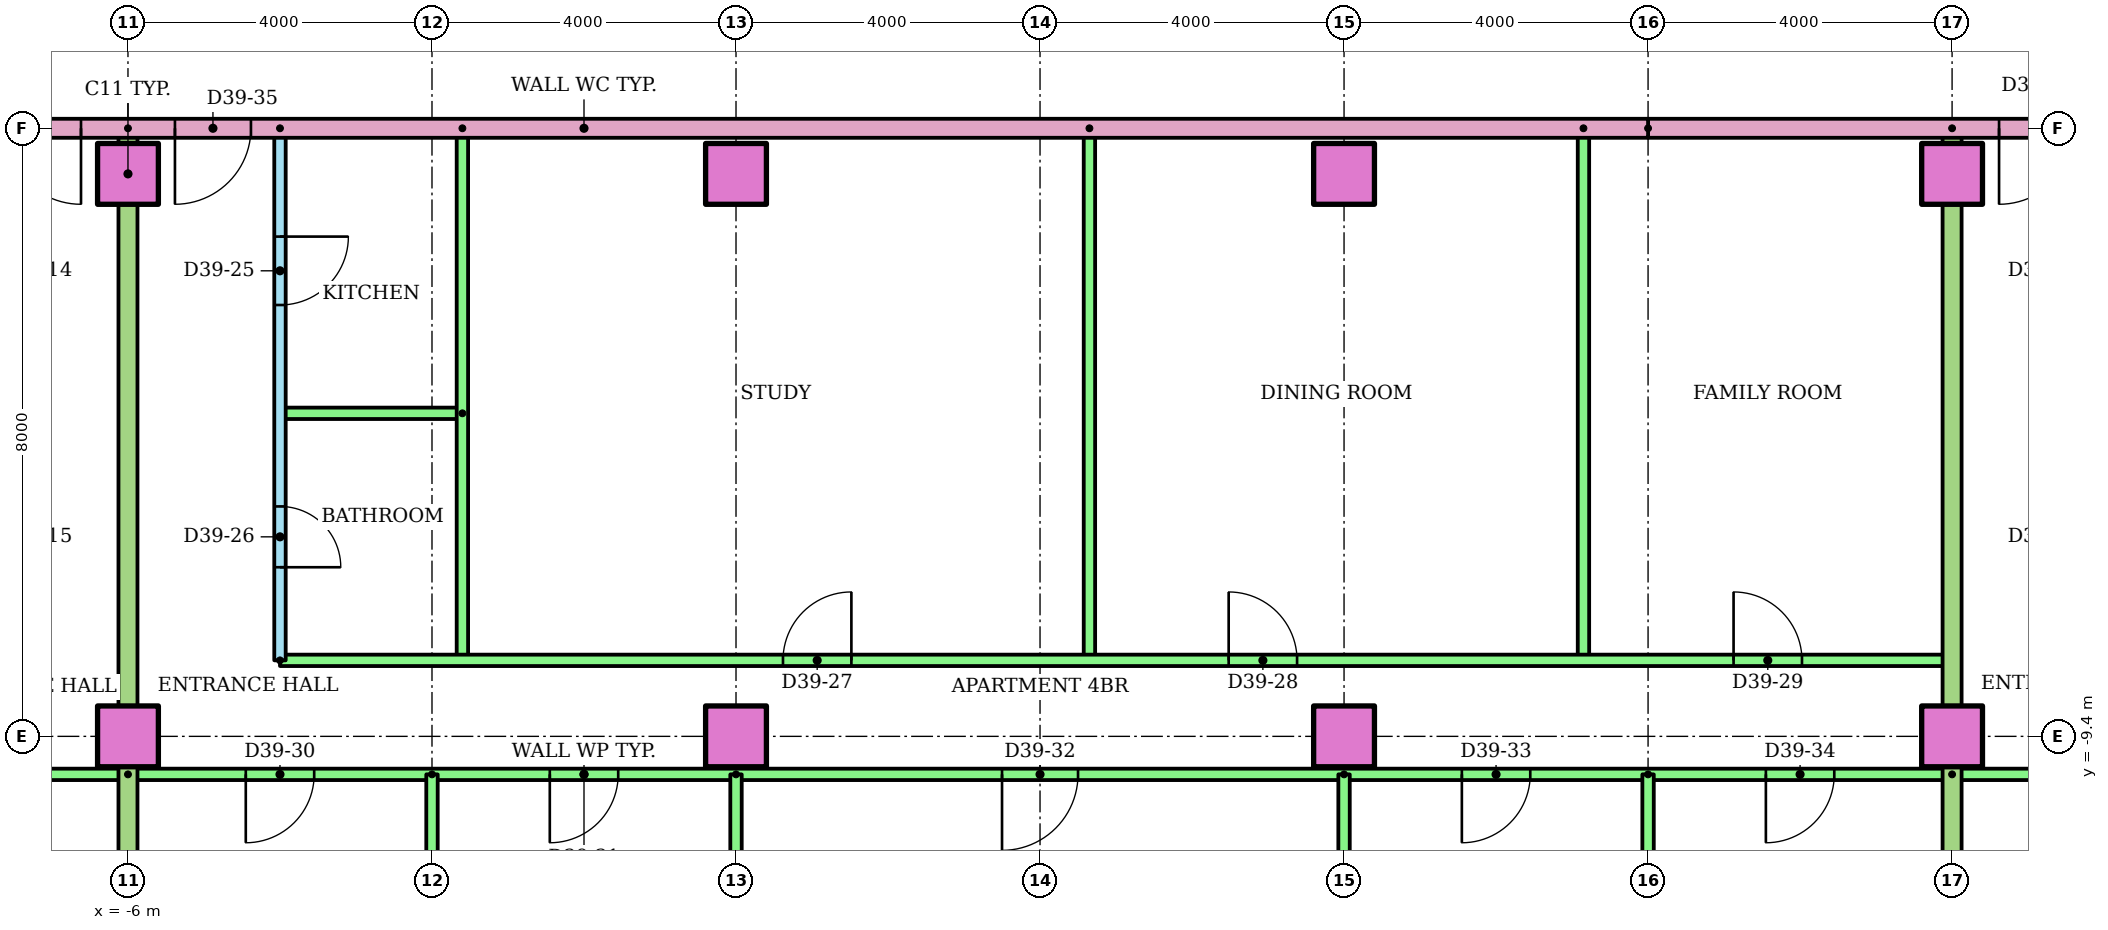
"""IFC4 building model, lengths in metres.
Left out: names, types, materials, properties, quantities, classifications, styles, units other than length and angle.
Written with IfcOpenShell. Run it as: python <this file> out.ifc"""

import sys

from ifc_helpers import new_model, si_unit, direction, frame, frame_2d, origin, origin_2d, place, context, subcontext, project, spatial, rectangle, extrude, element, fill, save


model = new_model("IFC4")
c1 = context("Model", 3, precision=1e-05, world=origin(), true_north=direction((0.0, 1.0)))
c2 = subcontext(c1, "Body", "Model", "MODEL_VIEW")
j1 = project(units=[si_unit("LENGTHUNIT", "METRE"), si_unit("PLANEANGLEUNIT", "RADIAN")], contexts=[c1])
p1 = place(None, origin())
s1 = spatial("IfcSite", under=j1, at=p1, CompositionType="ELEMENT")
p2 = place(p1, origin())
s2 = spatial("IfcBuilding", under=s1, at=p2, CompositionType="ELEMENT")
p3 = place(p2, frame((0.0, 0.0, 148.6)))
s3 = spatial("IfcBuildingStorey", under=s2, at=p3, CompositionType="ELEMENT", Elevation=148.6)
for number, where in (
    (1, (-6.0, -9.4, 0.0)),
    (2, (2.0, -9.4, 0.0)),
    (3, (10.0, -9.4, 0.0)),
    (4, (18.0, -9.4, 0.0)),
    (5, (-6.0, -2.0, 0.0)),
    (6, (2.0, -2.0, 0.0)),
    (7, (10.0, -2.0, 0.0)),
    (8, (18.0, -2.0, 0.0)),
):
    element("IfcColumn", number, at=place(p3, frame(where)), inside=s3, PredefinedType="COLUMN", context=c2, shape_type="SweptSolid", body=[
        extrude(rectangle(XDim=0.8, YDim=0.8, at=origin_2d()), origin(), (0.0, 0.0, 1.0), 3.2),
    ])
p4 = place(p3, frame((-6.0, -9.9, 0.0), z_axis=(0.0, 0.0, 1.0), x_axis=(-1.0, 0.0, 0.0)))
e9 = element("IfcWall", 9, at=p4, inside=s3, PredefinedType="PARTITIONING", context=c2, shape_type="SweptSolid", body=[
    extrude(rectangle(XDim=26.72, YDim=0.15, at=frame_2d((13.36, 0.0))), origin(), (0.0, 0.0, 1.0), 2.4),
])
p5 = place(p4, frame((20.75, 0.0, 0.0)))
e10 = element("IfcOpeningElement", 10, at=p5, cuts=e9, PredefinedType="OPENING", context=c2, shape_type="SweptSolid", body=[
    extrude(rectangle(XDim=1.0, YDim=2.1, at=frame_2d((0.5, 1.05))), frame((0.0, 0.085, 0.0), z_axis=(0.0, -1.0, 0.0), x_axis=(1.0, 0.0, 0.0)), (0.0, 0.0, 1.0), 0.17),
])
p6 = place(p4, frame((13.55, 0.0, 0.0)))
e11 = element("IfcOpeningElement", 11, at=p6, cuts=e9, PredefinedType="OPENING", context=c2, shape_type="SweptSolid", body=[
    extrude(rectangle(XDim=0.9, YDim=2.1, at=frame_2d((0.45, 1.05))), frame((0.0, 0.085, 0.0), z_axis=(0.0, -1.0, 0.0), x_axis=(1.0, 0.0, 0.0)), (0.0, 0.0, 1.0), 0.17),
])
p7 = place(p4, frame((9.55, 0.0, 0.0)))
e12 = element("IfcOpeningElement", 12, at=p7, cuts=e9, PredefinedType="OPENING", context=c2, shape_type="SweptSolid", body=[
    extrude(rectangle(XDim=0.9, YDim=2.1, at=frame_2d((0.45, 1.05))), frame((0.0, 0.085, 0.0), z_axis=(0.0, -1.0, 0.0), x_axis=(1.0, 0.0, 0.0)), (0.0, 0.0, 1.0), 0.17),
])
p8 = place(p4, frame((5.55, 0.0, 0.0)))
e13 = element("IfcOpeningElement", 13, at=p8, cuts=e9, PredefinedType="OPENING", context=c2, shape_type="SweptSolid", body=[
    extrude(rectangle(XDim=0.9, YDim=2.1, at=frame_2d((0.45, 1.05))), frame((0.0, 0.085, 0.0), z_axis=(0.0, -1.0, 0.0), x_axis=(1.0, 0.0, 0.0)), (0.0, 0.0, 1.0), 0.17),
])
p9 = place(p4, frame((1.55, 0.0, 0.0)))
e14 = element("IfcOpeningElement", 14, at=p9, cuts=e9, PredefinedType="OPENING", context=c2, shape_type="SweptSolid", body=[
    extrude(rectangle(XDim=0.9, YDim=2.1, at=frame_2d((0.45, 1.05))), frame((0.0, 0.085, 0.0), z_axis=(0.0, -1.0, 0.0), x_axis=(1.0, 0.0, 0.0)), (0.0, 0.0, 1.0), 0.17),
])
p10 = place(p3, frame((-4.0, -1.4, 0.0), z_axis=(0.0, 0.0, 1.0), x_axis=(0.0, -1.0, 0.0)))
e15 = element("IfcWall", 15, at=p10, inside=s3, PredefinedType="PARTITIONING", context=c2, shape_type="SweptSolid", body=[
    extrude(rectangle(XDim=7.0, YDim=0.15, at=frame_2d((3.5, 0.0))), origin(), (0.0, 0.0, 1.0), 2.4),
])
p11 = place(p10, frame((1.425, 0.0, 0.0)))
e16 = element("IfcOpeningElement", 16, at=p11, cuts=e15, PredefinedType="OPENING", context=c2, shape_type="SweptSolid", body=[
    extrude(rectangle(XDim=0.9, YDim=2.1, at=frame_2d((0.45, 1.05))), frame((0.0, 0.085, 0.0), z_axis=(0.0, -1.0, 0.0), x_axis=(1.0, 0.0, 0.0)), (0.0, 0.0, 1.0), 0.17),
])
p12 = place(p10, frame((4.975, 0.0, 0.0)))
e17 = element("IfcOpeningElement", 17, at=p12, cuts=e15, PredefinedType="OPENING", context=c2, shape_type="SweptSolid", body=[
    extrude(rectangle(XDim=0.8, YDim=2.1, at=frame_2d((0.4, 1.05))), frame((0.0, 0.085, 0.0), z_axis=(0.0, -1.0, 0.0), x_axis=(1.0, 0.0, 0.0)), (0.0, 0.0, 1.0), 0.17),
])
p13 = place(p3, frame((-1.6, -5.15, 0.0), z_axis=(0.0, 0.0, 1.0), x_axis=(-1.0, 0.0, 0.0)))
e18 = element("IfcWall", 18, at=p13, inside=s3, PredefinedType="PARTITIONING", context=c2, shape_type="SweptSolid", body=[
    extrude(rectangle(XDim=2.4, YDim=0.15, at=frame_2d((1.2, 0.0))), origin(), (0.0, 0.0, 1.0), 2.4),
])
for number, where, z_axis, x_axis in (
    (19, (-1.6, -1.4, 0.0), (0.0, 0.0, 1.0), (0.0, -1.0, 0.0)),
    (20, (6.65, -1.4, 0.0), (0.0, 0.0, 1.0), (0.0, -1.0, 0.0)),
    (21, (13.15, -1.4, 0.0), (0.0, 0.0, 1.0), (0.0, -1.0, 0.0)),
):
    element("IfcWall", number, at=place(p3, frame(where, z_axis=z_axis, x_axis=x_axis)), inside=s3, PredefinedType="PARTITIONING", context=c2, shape_type="SweptSolid", body=[
        extrude(rectangle(XDim=7.0, YDim=0.15, at=frame_2d((3.5, 0.0))), origin(), (0.0, 0.0, 1.0), 2.4),
    ])
p14 = place(p3, frame((-4.0, -8.4, 0.0)))
e22 = element("IfcWall", 22, at=p14, inside=s3, PredefinedType="PARTITIONING", context=c2, shape_type="SweptSolid", body=[
    extrude(rectangle(XDim=22.0, YDim=0.15, at=frame_2d((11.0, 0.0))), origin(), (0.0, 0.0, 1.0), 2.4),
])
p15 = place(p14, frame((6.618, 0.0, 0.0)))
e23 = element("IfcOpeningElement", 23, at=p15, cuts=e22, PredefinedType="OPENING", context=c2, shape_type="SweptSolid", body=[
    extrude(rectangle(XDim=0.9, YDim=2.1, at=frame_2d((0.45, 1.05))), frame((0.0, 0.085, 0.0), z_axis=(0.0, -1.0, 0.0), x_axis=(1.0, 0.0, 0.0)), (0.0, 0.0, 1.0), 0.17),
])
p16 = place(p14, frame((12.482, 0.0, 0.0)))
e24 = element("IfcOpeningElement", 24, at=p16, cuts=e22, PredefinedType="OPENING", context=c2, shape_type="SweptSolid", body=[
    extrude(rectangle(XDim=0.9, YDim=2.1, at=frame_2d((0.45, 1.05))), frame((0.0, 0.085, 0.0), z_axis=(0.0, -1.0, 0.0), x_axis=(1.0, 0.0, 0.0)), (0.0, 0.0, 1.0), 0.17),
])
p17 = place(p14, frame((19.125, 0.0, 0.0)))
e25 = element("IfcOpeningElement", 25, at=p17, cuts=e22, PredefinedType="OPENING", context=c2, shape_type="SweptSolid", body=[
    extrude(rectangle(XDim=0.9, YDim=2.1, at=frame_2d((0.45, 1.05))), frame((0.0, 0.085, 0.0), z_axis=(0.0, -1.0, 0.0), x_axis=(1.0, 0.0, 0.0)), (0.0, 0.0, 1.0), 0.17),
])
p18 = place(p3, frame((18.0, -9.9, 0.0), z_axis=(0.0, 0.0, 1.0), x_axis=(-1.0, 0.0, 0.0)))
e26 = element("IfcWall", 26, at=p18, inside=s3, PredefinedType="PARTITIONING", context=c2, shape_type="SweptSolid", body=[
    extrude(rectangle(XDim=24.0, YDim=0.15, at=frame_2d((12.0, 0.0))), origin(), (0.0, 0.0, 1.0), 2.4),
])
p19 = place(p18, frame((21.55, 0.0, 0.0)))
e27 = element("IfcOpeningElement", 27, at=p19, cuts=e26, PredefinedType="OPENING", context=c2, shape_type="SweptSolid", body=[
    extrude(rectangle(XDim=0.9, YDim=2.1, at=frame_2d((0.45, 1.05))), frame((0.0, 0.085, 0.0), z_axis=(0.0, -1.0, 0.0), x_axis=(1.0, 0.0, 0.0)), (0.0, 0.0, 1.0), 0.17),
])
p20 = place(p18, frame((17.55, 0.0, 0.0)))
e28 = element("IfcOpeningElement", 28, at=p20, cuts=e26, PredefinedType="OPENING", context=c2, shape_type="SweptSolid", body=[
    extrude(rectangle(XDim=0.9, YDim=2.1, at=frame_2d((0.45, 1.05))), frame((0.0, 0.085, 0.0), z_axis=(0.0, -1.0, 0.0), x_axis=(1.0, 0.0, 0.0)), (0.0, 0.0, 1.0), 0.17),
])
p21 = place(p18, frame((11.5, 0.0, 0.0)))
e29 = element("IfcOpeningElement", 29, at=p21, cuts=e26, PredefinedType="OPENING", context=c2, shape_type="SweptSolid", body=[
    extrude(rectangle(XDim=1.0, YDim=2.1, at=frame_2d((0.5, 1.05))), frame((0.0, 0.085, 0.0), z_axis=(0.0, -1.0, 0.0), x_axis=(1.0, 0.0, 0.0)), (0.0, 0.0, 1.0), 0.17),
])
p22 = place(p18, frame((5.55, 0.0, 0.0)))
e30 = element("IfcOpeningElement", 30, at=p22, cuts=e26, PredefinedType="OPENING", context=c2, shape_type="SweptSolid", body=[
    extrude(rectangle(XDim=0.9, YDim=2.1, at=frame_2d((0.45, 1.05))), frame((0.0, 0.085, 0.0), z_axis=(0.0, -1.0, 0.0), x_axis=(1.0, 0.0, 0.0)), (0.0, 0.0, 1.0), 0.17),
])
p23 = place(p18, frame((1.55, 0.0, 0.0)))
e31 = element("IfcOpeningElement", 31, at=p23, cuts=e26, PredefinedType="OPENING", context=c2, shape_type="SweptSolid", body=[
    extrude(rectangle(XDim=0.9, YDim=2.1, at=frame_2d((0.45, 1.05))), frame((0.0, 0.085, 0.0), z_axis=(0.0, -1.0, 0.0), x_axis=(1.0, 0.0, 0.0)), (0.0, 0.0, 1.0), 0.17),
])
p24 = place(p3, frame((-2.0, -9.9, 0.0), z_axis=(0.0, 0.0, 1.0), x_axis=(0.0, -1.0, 0.0)))
e32 = element("IfcWall", 32, at=p24, inside=s3, PredefinedType="PARTITIONING", context=c2, shape_type="SweptSolid", body=[
    extrude(rectangle(XDim=6.421, YDim=0.15, at=frame_2d((3.21, 0.0))), origin(), (0.0, 0.0, 1.0), 2.4),
])
for number, where, z_axis, x_axis in (
    (33, (2.0, -9.9, 0.0), (0.0, 0.0, 1.0), (0.0, -1.0, 0.0)),
    (34, (10.0, -9.9, 0.0), (0.0, 0.0, 1.0), (0.0, -1.0, 0.0)),
):
    element("IfcWall", number, at=place(p3, frame(where, z_axis=z_axis, x_axis=x_axis)), inside=s3, PredefinedType="PARTITIONING", context=c2, shape_type="SweptSolid", body=[
        extrude(rectangle(XDim=6.41, YDim=0.15, at=frame_2d((3.205, 0.0))), origin(), (0.0, 0.0, 1.0), 2.4),
    ])
p25 = place(p3, frame((14.0, -9.9, 0.0), z_axis=(0.0, 0.0, 1.0), x_axis=(0.0, -1.0, 0.0)))
e35 = element("IfcWall", 35, at=p25, inside=s3, PredefinedType="PARTITIONING", context=c2, shape_type="SweptSolid", body=[
    extrude(rectangle(XDim=6.421, YDim=0.15, at=frame_2d((3.21, 0.0))), origin(), (0.0, 0.0, 1.0), 2.4),
])
p26 = place(p3, frame((-6.0, -1.4, 0.0), z_axis=(0.0, 0.0, 1.0), x_axis=(0.0, -1.0, 0.0)))
e36 = element("IfcWall", 36, at=p26, inside=s3, PredefinedType="PARTITIONING", context=c2, shape_type="SweptSolid", body=[
    extrude(rectangle(XDim=14.91, YDim=0.25, at=frame_2d((7.455, 0.0))), origin(), (0.0, 0.0, 1.0), 2.4),
])
p27 = place(p3, frame((32.72, -9.9, 0.0), z_axis=(0.0, 0.0, 1.0), x_axis=(-1.0, 0.0, 0.0)))
e37 = element("IfcWall", 37, at=p27, inside=s3, PredefinedType="PARTITIONING", context=c2, shape_type="SweptSolid", body=[
    extrude(rectangle(XDim=14.72, YDim=0.15, at=frame_2d((7.36, 0.0))), origin(), (0.0, 0.0, 1.0), 2.4),
])
p28 = place(p27, frame((10.22, 0.0, 0.0)))
e38 = element("IfcOpeningElement", 38, at=p28, cuts=e37, PredefinedType="OPENING", context=c2, shape_type="SweptSolid", body=[
    extrude(rectangle(XDim=1.0, YDim=2.1, at=frame_2d((0.5, 1.05))), frame((0.0, 0.085, 0.0), z_axis=(0.0, -1.0, 0.0), x_axis=(1.0, 0.0, 0.0)), (0.0, 0.0, 1.0), 0.17),
])
p29 = place(p27, frame((3.02, 0.0, 0.0)))
e39 = element("IfcOpeningElement", 39, at=p29, cuts=e37, PredefinedType="OPENING", context=c2, shape_type="SweptSolid", body=[
    extrude(rectangle(XDim=0.9, YDim=2.1, at=frame_2d((0.45, 1.05))), frame((0.0, 0.085, 0.0), z_axis=(0.0, -1.0, 0.0), x_axis=(1.0, 0.0, 0.0)), (0.0, 0.0, 1.0), 0.17),
])
p30 = place(p3, frame((18.0, -1.4, 0.0), z_axis=(0.0, 0.0, 1.0), x_axis=(0.0, -1.0, 0.0)))
e40 = element("IfcWall", 40, at=p30, inside=s3, PredefinedType="PARTITIONING", context=c2, shape_type="SweptSolid", body=[
    extrude(rectangle(XDim=14.91, YDim=0.25, at=frame_2d((7.455, 0.0))), origin(), (0.0, 0.0, 1.0), 2.4),
])
p31 = place(p3, frame((29.0, -1.4, 0.0), z_axis=(0.0, 0.0, 1.0), x_axis=(-1.0, 0.0, 0.0)))
e41 = element("IfcWall", 41, at=p31, inside=s3, PredefinedType="PARTITIONING", context=c2, shape_type="SweptSolid", body=[
    extrude(rectangle(XDim=15.0, YDim=0.25, at=frame_2d((7.5, 0.0))), origin(), (0.0, 0.0, 1.0), 2.4),
])
p32 = place(p31, frame((9.382, 0.0, 0.0)))
e42 = element("IfcOpeningElement", 42, at=p32, cuts=e41, PredefinedType="OPENING", context=c2, shape_type="SweptSolid", body=[
    extrude(rectangle(XDim=1.0, YDim=2.1, at=frame_2d((0.5, 1.05))), frame((0.0, 0.135, 0.0), z_axis=(0.0, -1.0, 0.0), x_axis=(1.0, 0.0, 0.0)), (0.0, 0.0, 1.0), 0.27),
])
p33 = place(p3, frame((14.0, -1.4, 0.0), z_axis=(0.0, 0.0, 1.0), x_axis=(-1.0, 0.0, 0.0)))
e43 = element("IfcWall", 43, at=p33, inside=s3, PredefinedType="PARTITIONING", context=c2, shape_type="SweptSolid", body=[
    extrude(rectangle(XDim=28.0, YDim=0.25, at=frame_2d((14.0, 0.0))), origin(), (0.0, 0.0, 1.0), 2.4),
])
p34 = place(p33, frame((20.618, 0.0, 0.0)))
e44 = element("IfcOpeningElement", 44, at=p34, cuts=e43, PredefinedType="OPENING", context=c2, shape_type="SweptSolid", body=[
    extrude(rectangle(XDim=1.0, YDim=2.1, at=frame_2d((0.5, 1.05))), frame((0.0, 0.135, 0.0), z_axis=(0.0, -1.0, 0.0), x_axis=(1.0, 0.0, 0.0)), (0.0, 0.0, 1.0), 0.27),
])
p35 = place(p33, frame((18.382, 0.0, 0.0)))
e45 = element("IfcOpeningElement", 45, at=p35, cuts=e43, PredefinedType="OPENING", context=c2, shape_type="SweptSolid", body=[
    extrude(rectangle(XDim=1.0, YDim=2.1, at=frame_2d((0.5, 1.05))), frame((0.0, 0.135, 0.0), z_axis=(0.0, -1.0, 0.0), x_axis=(1.0, 0.0, 0.0)), (0.0, 0.0, 1.0), 0.27),
])
p36 = place(p34, origin())
e46 = element("IfcDoor", 46, at=p36, inside=s3, OperationType="SINGLE_SWING_LEFT", PredefinedType="DOOR", context=c2, shape_type="SweptSolid", body=[
    extrude(rectangle(XDim=1.0, YDim=2.1, at=frame_2d((0.5, 1.05))), frame((0.0, 0.025, 0.0), z_axis=(0.0, -1.0, 0.0), x_axis=(1.0, 0.0, 0.0)), (0.0, 0.0, 1.0), 0.05),
])
fill(e44, e46)
p37 = place(p11, origin())
e47 = element("IfcDoor", 47, at=p37, inside=s3, OperationType="SINGLE_SWING_LEFT", PredefinedType="DOOR", context=c2, shape_type="SweptSolid", body=[
    extrude(rectangle(XDim=0.9, YDim=2.1, at=frame_2d((0.45, 1.05))), frame((0.0, 0.025, 0.0), z_axis=(0.0, -1.0, 0.0), x_axis=(1.0, 0.0, 0.0)), (0.0, 0.0, 1.0), 0.05),
])
fill(e16, e47)
p38 = place(p12, origin())
e48 = element("IfcDoor", 48, at=p38, inside=s3, OperationType="SINGLE_SWING_RIGHT", PredefinedType="DOOR", context=c2, shape_type="SweptSolid", body=[
    extrude(rectangle(XDim=0.8, YDim=2.1, at=frame_2d((0.4, 1.05))), frame((0.0, 0.025, 0.0), z_axis=(0.0, -1.0, 0.0), x_axis=(1.0, 0.0, 0.0)), (0.0, 0.0, 1.0), 0.05),
])
fill(e17, e48)
p39 = place(p15, origin())
e49 = element("IfcDoor", 49, at=p39, inside=s3, OperationType="SINGLE_SWING_RIGHT", PredefinedType="DOOR", context=c2, shape_type="SweptSolid", body=[
    extrude(rectangle(XDim=0.9, YDim=2.1, at=frame_2d((0.45, 1.05))), frame((0.0, 0.025, 0.0), z_axis=(0.0, -1.0, 0.0), x_axis=(1.0, 0.0, 0.0)), (0.0, 0.0, 1.0), 0.05),
])
fill(e23, e49)
p40 = place(p16, origin())
e50 = element("IfcDoor", 50, at=p40, inside=s3, OperationType="SINGLE_SWING_LEFT", PredefinedType="DOOR", context=c2, shape_type="SweptSolid", body=[
    extrude(rectangle(XDim=0.9, YDim=2.1, at=frame_2d((0.45, 1.05))), frame((0.0, 0.025, 0.0), z_axis=(0.0, -1.0, 0.0), x_axis=(1.0, 0.0, 0.0)), (0.0, 0.0, 1.0), 0.05),
])
fill(e24, e50)
p41 = place(p17, origin())
e51 = element("IfcDoor", 51, at=p41, inside=s3, OperationType="SINGLE_SWING_LEFT", PredefinedType="DOOR", context=c2, shape_type="SweptSolid", body=[
    extrude(rectangle(XDim=0.9, YDim=2.1, at=frame_2d((0.45, 1.05))), frame((0.0, 0.025, 0.0), z_axis=(0.0, -1.0, 0.0), x_axis=(1.0, 0.0, 0.0)), (0.0, 0.0, 1.0), 0.05),
])
fill(e25, e51)
p42 = place(p19, origin())
e52 = element("IfcDoor", 52, at=p42, inside=s3, OperationType="SINGLE_SWING_RIGHT", PredefinedType="DOOR", context=c2, shape_type="SweptSolid", body=[
    extrude(rectangle(XDim=0.9, YDim=2.1, at=frame_2d((0.45, 1.05))), frame((0.0, 0.025, 0.0), z_axis=(0.0, -1.0, 0.0), x_axis=(1.0, 0.0, 0.0)), (0.0, 0.0, 1.0), 0.05),
])
fill(e27, e52)
p43 = place(p20, origin())
e53 = element("IfcDoor", 53, at=p43, inside=s3, OperationType="SINGLE_SWING_RIGHT", PredefinedType="DOOR", context=c2, shape_type="SweptSolid", body=[
    extrude(rectangle(XDim=0.9, YDim=2.1, at=frame_2d((0.45, 1.05))), frame((0.0, 0.025, 0.0), z_axis=(0.0, -1.0, 0.0), x_axis=(1.0, 0.0, 0.0)), (0.0, 0.0, 1.0), 0.05),
])
fill(e28, e53)
p44 = place(p21, origin())
e54 = element("IfcDoor", 54, at=p44, inside=s3, OperationType="SINGLE_SWING_RIGHT", PredefinedType="DOOR", context=c2, shape_type="SweptSolid", body=[
    extrude(rectangle(XDim=1.0, YDim=2.1, at=frame_2d((0.5, 1.05))), frame((0.0, 0.025, 0.0), z_axis=(0.0, -1.0, 0.0), x_axis=(1.0, 0.0, 0.0)), (0.0, 0.0, 1.0), 0.05),
])
fill(e29, e54)
p45 = place(p22, origin())
e55 = element("IfcDoor", 55, at=p45, inside=s3, OperationType="SINGLE_SWING_RIGHT", PredefinedType="DOOR", context=c2, shape_type="SweptSolid", body=[
    extrude(rectangle(XDim=0.9, YDim=2.1, at=frame_2d((0.45, 1.05))), frame((0.0, 0.025, 0.0), z_axis=(0.0, -1.0, 0.0), x_axis=(1.0, 0.0, 0.0)), (0.0, 0.0, 1.0), 0.05),
])
fill(e30, e55)
p46 = place(p23, origin())
e56 = element("IfcDoor", 56, at=p46, inside=s3, OperationType="SINGLE_SWING_RIGHT", PredefinedType="DOOR", context=c2, shape_type="SweptSolid", body=[
    extrude(rectangle(XDim=0.9, YDim=2.1, at=frame_2d((0.45, 1.05))), frame((0.0, 0.025, 0.0), z_axis=(0.0, -1.0, 0.0), x_axis=(1.0, 0.0, 0.0)), (0.0, 0.0, 1.0), 0.05),
])
fill(e31, e56)
p47 = place(p35, origin())
e57 = element("IfcDoor", 57, at=p47, inside=s3, OperationType="SINGLE_SWING_RIGHT", PredefinedType="DOOR", context=c2, shape_type="SweptSolid", body=[
    extrude(rectangle(XDim=1.0, YDim=2.1, at=frame_2d((0.5, 1.05))), frame((0.0, 0.025, 0.0), z_axis=(0.0, -1.0, 0.0), x_axis=(1.0, 0.0, 0.0)), (0.0, 0.0, 1.0), 0.05),
])
fill(e45, e57)
p48 = place(p32, origin())
e58 = element("IfcDoor", 58, at=p48, inside=s3, OperationType="SINGLE_SWING_RIGHT", PredefinedType="DOOR", context=c2, shape_type="SweptSolid", body=[
    extrude(rectangle(XDim=1.0, YDim=2.1, at=frame_2d((0.5, 1.05))), frame((0.0, 0.025, 0.0), z_axis=(0.0, -1.0, 0.0), x_axis=(1.0, 0.0, 0.0)), (0.0, 0.0, 1.0), 0.05),
])
fill(e42, e58)
save(model, sys.argv[1])
